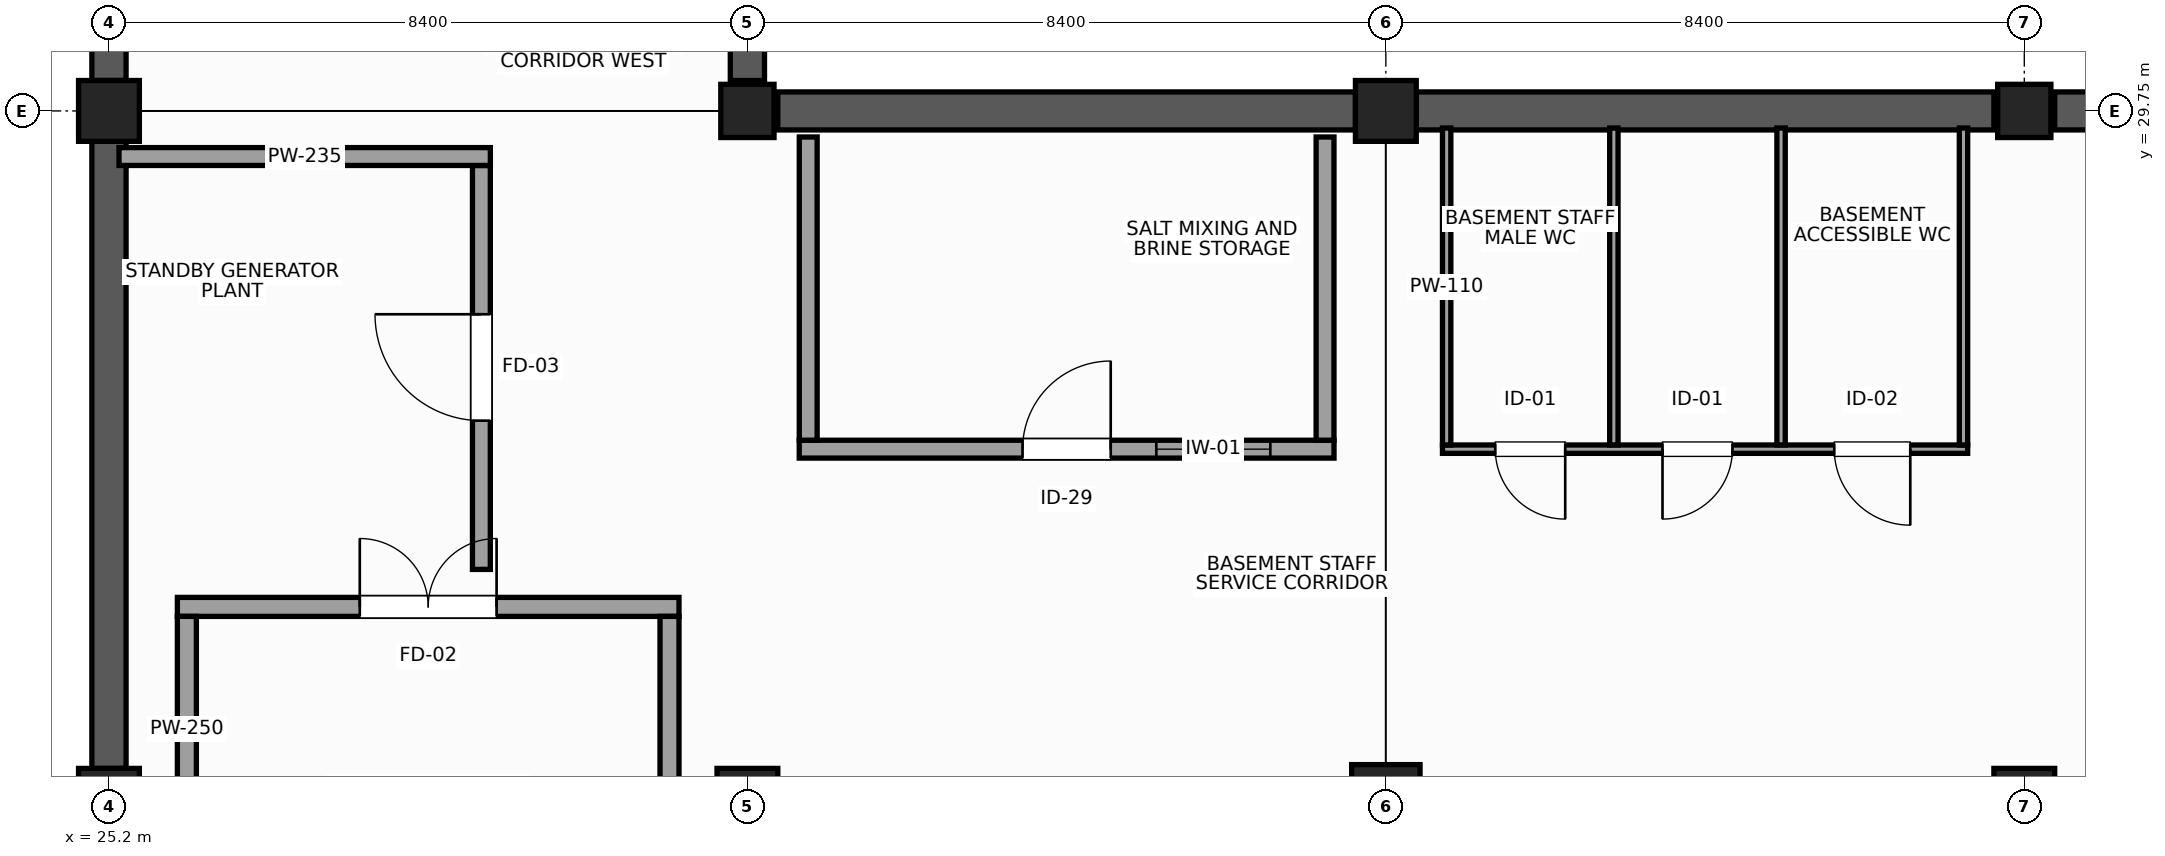
"""IFC4 building model, lengths in metres.
Left out: names, types, materials, properties, quantities, classifications, styles, units other than length and angle.
Written with IfcOpenShell. Run it as: python <this file> out.ifc"""

import sys

from ifc_helpers import new_model, si_unit, direction, frame, frame_2d, origin, origin_2d, place, context, subcontext, project, spatial, rectangle, extrude, element, fill, save


model = new_model("IFC4")
c1 = context("Model", 3, precision=1e-05, world=origin(), true_north=direction((0.0, 1.0)))
c2 = subcontext(c1, "Body", "Model", "MODEL_VIEW")
j1 = project(units=[si_unit("LENGTHUNIT", "METRE"), si_unit("PLANEANGLEUNIT", "RADIAN")], contexts=[c1])
p1 = place(None, origin())
s1 = spatial("IfcSite", under=j1, at=p1, CompositionType="ELEMENT")
p2 = place(p1, origin())
s2 = spatial("IfcBuilding", under=s1, at=p2, CompositionType="ELEMENT")
p3 = place(p2, frame((0.0, 0.0, -5.4)))
s3 = spatial("IfcBuildingStorey", under=s2, at=p3, CompositionType="ELEMENT", Elevation=-5.4)
for number, where, z_axis, x_axis in (
    (1, (25.2, 20.7, -0.4), (0.0, 0.0, 1.0), (1.0, 0.0, 0.0)),
    (2, (25.2, 29.75, -0.4), (0.0, 0.0, 1.0), (1.0, 0.0, 0.0)),
    (3, (33.6, 20.7, -0.4), (0.0, 0.0, 1.0), (1.0, 0.0, 0.0)),
):
    element("IfcColumn", number, at=place(p3, frame(where, z_axis=z_axis, x_axis=x_axis)), inside=s3, PredefinedType="COLUMN", context=c2, shape_type="SweptSolid", body=[
        extrude(rectangle(XDim=0.8, YDim=0.8, at=origin_2d()), origin(), (0.0, 0.0, 1.0), 5.8),
    ])
p4 = place(p3, frame((33.6, 29.75, -0.4), z_axis=(0.0, 0.0, 1.0), x_axis=(1.0, 0.0, 0.0)))
e4 = element("IfcColumn", 4, at=p4, inside=s3, PredefinedType="COLUMN", context=c2, shape_type="SweptSolid", body=[
    extrude(rectangle(XDim=0.7, YDim=0.7, at=origin_2d()), origin(), (0.0, 0.0, 1.0), 5.8),
])
p5 = place(p3, frame((42.0, 20.7, -0.4), z_axis=(0.0, 0.0, 1.0), x_axis=(1.0, 0.0, 0.0)))
e5 = element("IfcColumn", 5, at=p5, inside=s3, PredefinedType="COLUMN", context=c2, shape_type="SweptSolid", body=[
    extrude(rectangle(XDim=0.9, YDim=0.9, at=origin_2d()), origin(), (0.0, 0.0, 1.0), 5.8),
])
for number, where, z_axis, x_axis in (
    (6, (42.0, 29.75, -0.4), (0.0, 0.0, 1.0), (1.0, 0.0, 0.0)),
    (7, (50.4, 20.7, -0.4), (0.0, 0.0, 1.0), (1.0, 0.0, 0.0)),
):
    element("IfcColumn", number, at=place(p3, frame(where, z_axis=z_axis, x_axis=x_axis)), inside=s3, PredefinedType="COLUMN", context=c2, shape_type="SweptSolid", body=[
        extrude(rectangle(XDim=0.8, YDim=0.8, at=origin_2d()), origin(), (0.0, 0.0, 1.0), 5.8),
    ])
p6 = place(p3, frame((50.4, 29.75, -0.4), z_axis=(0.0, 0.0, 1.0), x_axis=(1.0, 0.0, 0.0)))
e8 = element("IfcColumn", 8, at=p6, inside=s3, PredefinedType="COLUMN", context=c2, shape_type="SweptSolid", body=[
    extrude(rectangle(XDim=0.7, YDim=0.7, at=origin_2d()), origin(), (0.0, 0.0, 1.0), 5.8),
])
for number, where, z_axis, x_axis in (
    (9, (25.2, 21.1, 0.0), (0.0, 0.0, 1.0), (0.0, 1.0, 0.0)),
    (10, (25.2, 30.15, 0.0), (0.0, 0.0, 1.0), (0.0, 1.0, 0.0)),
    (11, (33.6, 38.4, 0.0), (0.0, 0.0, 1.0), (0.0, -1.0, 0.0)),
):
    element("IfcWall", number, at=place(p3, frame(where, z_axis=z_axis, x_axis=x_axis)), inside=s3, PredefinedType="USERDEFINED", context=c2, shape_type="SweptSolid", body=[
        extrude(rectangle(XDim=8.25, YDim=0.45, at=frame_2d((4.125, 0.0))), origin(), (0.0, 0.0, 1.0), 5.08),
    ])
for number, where, z_axis, x_axis in (
    (12, (34.0, 29.75, 0.0), (0.0, 0.0, 1.0), (1.0, 0.0, 0.0)),
    (13, (42.4, 29.75, 0.0), (0.0, 0.0, 1.0), (1.0, 0.0, 0.0)),
):
    element("IfcWall", number, at=place(p3, frame(where, z_axis=z_axis, x_axis=x_axis)), inside=s3, PredefinedType="USERDEFINED", context=c2, shape_type="SweptSolid", body=[
        extrude(rectangle(XDim=7.6, YDim=0.5, at=frame_2d((3.8, 0.0))), origin(), (0.0, 0.0, 1.0), 5.08),
    ])
p7 = place(p3, frame((50.8, 29.75, 0.0), z_axis=(0.0, 0.0, 1.0), x_axis=(1.0, 0.0, 0.0)))
e14 = element("IfcWall", 14, at=p7, inside=s3, PredefinedType="USERDEFINED", context=c2, shape_type="SweptSolid", body=[
    extrude(rectangle(XDim=7.6, YDim=0.5, at=frame_2d((3.8, 0.0))), origin(), (0.0, 0.0, 1.0), 5.08),
])
p8 = place(p3, frame((26.1, 23.225, 0.0), z_axis=(0.0, 0.0, 1.0), x_axis=(1.0, 0.0, 0.0)))
e15 = element("IfcWall", 15, at=p8, inside=s3, PredefinedType="PARTITIONING", context=c2, shape_type="SweptSolid", body=[
    extrude(rectangle(XDim=6.6, YDim=0.25, at=frame_2d((3.3, 0.0))), origin(), (0.0, 0.0, 1.0), 5.08),
])
p9 = place(p8, frame((2.4, 0.0, 0.0)))
e16 = element("IfcOpeningElement", 16, at=p9, cuts=e15, PredefinedType="OPENING", context=c2, shape_type="SweptSolid", body=[
    extrude(rectangle(XDim=1.8, YDim=2.25, at=frame_2d((0.9, 1.125))), frame((0.0, 0.135, 0.0), z_axis=(0.0, -1.0, 0.0), x_axis=(1.0, 0.0, 0.0)), (0.0, 0.0, 1.0), 0.27),
])
for number, where, z_axis, x_axis in (
    (17, (26.225, 20.15, 0.0), (0.0, 0.0, 1.0), (0.0, 1.0, 0.0)),
    (18, (32.575, 20.15, 0.0), (0.0, 0.0, 1.0), (0.0, 1.0, 0.0)),
):
    element("IfcWall", number, at=place(p3, frame(where, z_axis=z_axis, x_axis=x_axis)), inside=s3, PredefinedType="PARTITIONING", context=c2, shape_type="SweptSolid", body=[
        extrude(rectangle(XDim=2.95, YDim=0.25, at=frame_2d((1.475, 0.0))), origin(), (0.0, 0.0, 1.0), 4.23),
    ])
p10 = place(p3, frame((42.745, 25.3, 0.0), z_axis=(0.0, 0.0, 1.0), x_axis=(1.0, 0.0, 0.0)))
e19 = element("IfcWall", 19, at=p10, inside=s3, PredefinedType="PARTITIONING", context=c2, shape_type="SweptSolid", body=[
    extrude(rectangle(XDim=6.91, YDim=0.11, at=frame_2d((3.455, 0.0))), origin(), (0.0, 0.0, 1.0), 4.23),
])
p11 = place(p10, frame((0.695, 0.0, 0.0)))
e20 = element("IfcOpeningElement", 20, at=p11, cuts=e19, PredefinedType="OPENING", context=c2, shape_type="SweptSolid", body=[
    extrude(rectangle(XDim=0.92, YDim=2.1, at=frame_2d((0.46, 1.05))), frame((0.0, 0.065, 0.0), z_axis=(0.0, -1.0, 0.0), x_axis=(1.0, 0.0, 0.0)), (0.0, 0.0, 1.0), 0.13),
])
p12 = place(p10, frame((2.895, 0.0, 0.0)))
e21 = element("IfcOpeningElement", 21, at=p12, cuts=e19, PredefinedType="OPENING", context=c2, shape_type="SweptSolid", body=[
    extrude(rectangle(XDim=0.92, YDim=2.1, at=frame_2d((0.46, 1.05))), frame((0.0, 0.065, 0.0), z_axis=(0.0, -1.0, 0.0), x_axis=(1.0, 0.0, 0.0)), (0.0, 0.0, 1.0), 0.13),
])
p13 = place(p10, frame((5.155, 0.0, 0.0)))
e22 = element("IfcOpeningElement", 22, at=p13, cuts=e19, PredefinedType="OPENING", context=c2, shape_type="SweptSolid", body=[
    extrude(rectangle(XDim=1.0, YDim=2.15, at=frame_2d((0.5, 1.075))), frame((0.0, 0.065, 0.0), z_axis=(0.0, -1.0, 0.0), x_axis=(1.0, 0.0, 0.0)), (0.0, 0.0, 1.0), 0.13),
])
for number, where, z_axis, x_axis in (
    (23, (42.8, 25.355, 0.0), (0.0, 0.0, 1.0), (0.0, 1.0, 0.0)),
    (24, (45.0, 25.355, 0.0), (0.0, 0.0, 1.0), (0.0, 1.0, 0.0)),
    (25, (47.2, 25.355, 0.0), (0.0, 0.0, 1.0), (0.0, 1.0, 0.0)),
    (26, (49.6, 25.355, 0.0), (0.0, 0.0, 1.0), (0.0, 1.0, 0.0)),
):
    element("IfcWall", number, at=place(p3, frame(where, z_axis=z_axis, x_axis=x_axis)), inside=s3, PredefinedType="PARTITIONING", context=c2, shape_type="SweptSolid", body=[
        extrude(rectangle(XDim=4.17, YDim=0.11, at=frame_2d((2.085, 0.0))), origin(), (0.0, 0.0, 1.0), 4.23),
    ])
p14 = place(p3, frame((34.282, 25.3, 0.0), z_axis=(0.0, 0.0, 1.0), x_axis=(1.0, 0.0, 0.0)))
e27 = element("IfcWall", 27, at=p14, inside=s3, PredefinedType="PARTITIONING", context=c2, shape_type="SweptSolid", body=[
    extrude(rectangle(XDim=7.036, YDim=0.235, at=frame_2d((3.518, 0.0))), origin(), (0.0, 0.0, 1.0), 5.08),
])
p15 = place(p14, frame((2.938, 0.0, 0.0)))
e28 = element("IfcOpeningElement", 28, at=p15, cuts=e27, PredefinedType="OPENING", context=c2, shape_type="SweptSolid", body=[
    extrude(rectangle(XDim=1.16, YDim=2.26, at=frame_2d((0.58, 1.13))), frame((0.0, 0.127, 0.0), z_axis=(0.0, -1.0, 0.0), x_axis=(1.0, 0.0, 0.0)), (0.0, 0.0, 1.0), 0.255),
])
p16 = place(p14, frame((4.698, 0.0, 1.05)))
e29 = element("IfcOpeningElement", 29, at=p16, cuts=e27, PredefinedType="OPENING", context=c2, shape_type="SweptSolid", body=[
    extrude(rectangle(XDim=1.5, YDim=1.2, at=frame_2d((0.75, 0.6))), frame((0.0, 0.127, 0.0), z_axis=(0.0, -1.0, 0.0), x_axis=(1.0, 0.0, 0.0)), (0.0, 0.0, 1.0), 0.255),
])
for number, where, z_axis, x_axis in (
    (30, (41.2, 25.418, 0.0), (0.0, 0.0, 1.0), (0.0, 1.0, 0.0)),
    (31, (34.4, 25.418, 0.0), (0.0, 0.0, 1.0), (0.0, 1.0, 0.0)),
):
    element("IfcWall", number, at=place(p3, frame(where, z_axis=z_axis, x_axis=x_axis)), inside=s3, PredefinedType="PARTITIONING", context=c2, shape_type="SweptSolid", body=[
        extrude(rectangle(XDim=3.989, YDim=0.235, at=frame_2d((1.995, 0.0))), origin(), (0.0, 0.0, 1.0), 4.23),
    ])
p17 = place(p3, frame((30.1, 23.718, 0.0), z_axis=(0.0, 0.0, 1.0), x_axis=(0.0, 1.0, 0.0)))
e32 = element("IfcWall", 32, at=p17, inside=s3, PredefinedType="PARTITIONING", context=c2, shape_type="SweptSolid", body=[
    extrude(rectangle(XDim=5.314, YDim=0.235, at=frame_2d((2.657, 0.0))), origin(), (0.0, 0.0, 1.0), 4.53),
])
p18 = place(p17, frame((1.957, 0.0, 0.0)))
e33 = element("IfcOpeningElement", 33, at=p18, cuts=e32, PredefinedType="OPENING", context=c2, shape_type="SweptSolid", body=[
    extrude(rectangle(XDim=1.4, YDim=2.25, at=frame_2d((0.7, 1.125))), frame((0.0, 0.127, 0.0), z_axis=(0.0, -1.0, 0.0), x_axis=(1.0, 0.0, 0.0)), (0.0, 0.0, 1.0), 0.255),
])
p19 = place(p3, frame((25.332, 29.15, 0.0), z_axis=(0.0, 0.0, 1.0), x_axis=(1.0, 0.0, 0.0)))
e34 = element("IfcWall", 34, at=p19, inside=s3, PredefinedType="PARTITIONING", context=c2, shape_type="SweptSolid", body=[
    extrude(rectangle(XDim=4.886, YDim=0.235, at=frame_2d((2.443, 0.0))), origin(), (0.0, 0.0, 1.0), 4.23),
])
p20 = place(p9, origin())
e35 = element("IfcDoor", 35, at=p20, inside=s3, OperationType="DOUBLE_DOOR_SINGLE_SWING", PredefinedType="DOOR", context=c2, shape_type="SweptSolid", body=[
    extrude(rectangle(XDim=1.8, YDim=2.25, at=frame_2d((0.9, 1.125))), frame((0.0, 0.025, 0.0), z_axis=(0.0, -1.0, 0.0), x_axis=(1.0, 0.0, 0.0)), (0.0, 0.0, 1.0), 0.05),
])
fill(e16, e35)
p21 = place(p11, frame((0.92, 0.0, 0.0), z_axis=(0.0, 0.0, 1.0), x_axis=(-1.0, 0.0, 0.0)))
e36 = element("IfcDoor", 36, at=p21, inside=s3, OperationType="SINGLE_SWING_LEFT", PredefinedType="DOOR", context=c2, shape_type="SweptSolid", body=[
    extrude(rectangle(XDim=0.92, YDim=2.1, at=frame_2d((0.46, 1.05))), frame((0.0, 0.025, 0.0), z_axis=(0.0, -1.0, 0.0), x_axis=(1.0, 0.0, 0.0)), (0.0, 0.0, 1.0), 0.05),
])
fill(e20, e36)
p22 = place(p12, frame((0.92, 0.0, 0.0), z_axis=(0.0, 0.0, 1.0), x_axis=(-1.0, 0.0, 0.0)))
e37 = element("IfcDoor", 37, at=p22, inside=s3, OperationType="SINGLE_SWING_RIGHT", PredefinedType="DOOR", context=c2, shape_type="SweptSolid", body=[
    extrude(rectangle(XDim=0.92, YDim=2.1, at=frame_2d((0.46, 1.05))), frame((0.0, 0.025, 0.0), z_axis=(0.0, -1.0, 0.0), x_axis=(1.0, 0.0, 0.0)), (0.0, 0.0, 1.0), 0.05),
])
fill(e21, e37)
p23 = place(p13, frame((1.0, 0.0, 0.0), z_axis=(0.0, 0.0, 1.0), x_axis=(-1.0, 0.0, 0.0)))
e38 = element("IfcDoor", 38, at=p23, inside=s3, OperationType="SINGLE_SWING_LEFT", PredefinedType="DOOR", context=c2, shape_type="SweptSolid", body=[
    extrude(rectangle(XDim=1.0, YDim=2.15, at=frame_2d((0.5, 1.075))), frame((0.0, 0.025, 0.0), z_axis=(0.0, -1.0, 0.0), x_axis=(1.0, 0.0, 0.0)), (0.0, 0.0, 1.0), 0.05),
])
fill(e22, e38)
p24 = place(p15, origin())
e39 = element("IfcDoor", 39, at=p24, inside=s3, OperationType="SINGLE_SWING_RIGHT", PredefinedType="DOOR", context=c2, shape_type="SweptSolid", body=[
    extrude(rectangle(XDim=1.16, YDim=2.26, at=frame_2d((0.58, 1.13))), frame((0.0, 0.025, 0.0), z_axis=(0.0, -1.0, 0.0), x_axis=(1.0, 0.0, 0.0)), (0.0, 0.0, 1.0), 0.05),
])
fill(e28, e39)
p25 = place(p16, origin())
e40 = element("IfcWindow", 40, at=p25, inside=s3, PartitioningType="SINGLE_PANEL", PredefinedType="WINDOW", context=c2, shape_type="SweptSolid", body=[
    extrude(rectangle(XDim=1.5, YDim=1.2, at=frame_2d((0.75, 0.6))), frame((0.0, 0.03, 0.0), z_axis=(0.0, -1.0, 0.0), x_axis=(1.0, 0.0, 0.0)), (0.0, 0.0, 1.0), 0.06),
])
fill(e29, e40)
p26 = place(p18, origin())
e41 = element("IfcDoor", 41, at=p26, inside=s3, OperationType="SINGLE_SWING_RIGHT", PredefinedType="DOOR", context=c2, shape_type="SweptSolid", body=[
    extrude(rectangle(XDim=1.4, YDim=2.25, at=frame_2d((0.7, 1.125))), frame((0.0, 0.025, 0.0), z_axis=(0.0, -1.0, 0.0), x_axis=(1.0, 0.0, 0.0)), (0.0, 0.0, 1.0), 0.05),
])
fill(e33, e41)
save(model, sys.argv[1])
